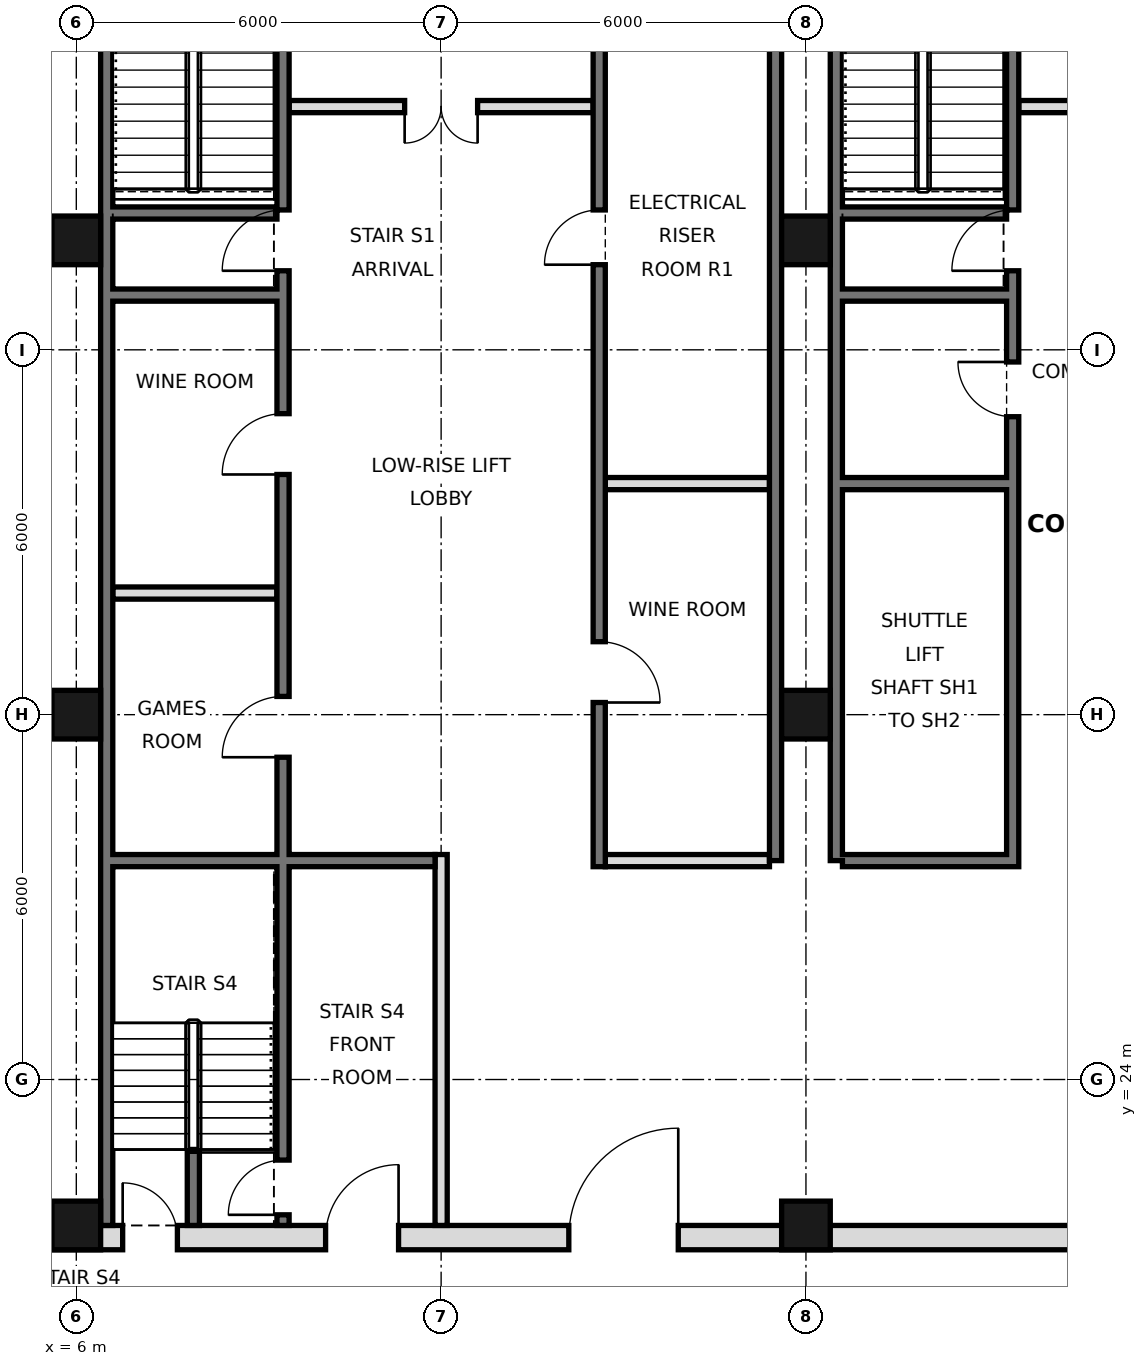
"""IFC4 building model, lengths in metres.
Left out: names, types, materials, properties, quantities, classifications, styles, units other than length and angle.
Written with IfcOpenShell. Run it as: python <this file> out.ifc"""

import sys

from ifc_helpers import new_model, si_unit, direction, frame, frame_2d, origin, origin_2d, place, context, subcontext, project, spatial, rectangle, hollow_rectangle, extrude, element, fill, save


model = new_model("IFC4")
c1 = context("Model", 3, precision=1e-05, world=origin(), true_north=direction((0.0, 1.0)))
c2 = subcontext(c1, "Body", "Model", "MODEL_VIEW")
j1 = project(units=[si_unit("LENGTHUNIT", "METRE"), si_unit("PLANEANGLEUNIT", "RADIAN")], contexts=[c1])
p1 = place(None, origin())
s1 = spatial("IfcSite", under=j1, at=p1, CompositionType="ELEMENT")
p2 = place(p1, origin())
s2 = spatial("IfcBuilding", under=s1, at=p2, CompositionType="ELEMENT")
p3 = place(p2, frame((0.0, 0.0, 186.0)))
s3 = spatial("IfcBuildingStorey", under=s2, at=p3, CompositionType="ELEMENT", Elevation=186.0)
for number, where, z_axis, x_axis in (
    (1, (6.0, 21.6, 0.0), (0.0, 0.0, 1.0), (1.0, 0.0, 0.0)),
    (2, (6.0, 30.0, 0.0), (0.0, 0.0, 1.0), (1.0, 0.0, 0.0)),
    (3, (6.0, 37.8, 0.0), (0.0, 0.0, 1.0), (1.0, 0.0, 0.0)),
    (4, (18.0, 21.6, 0.0), (0.0, 0.0, 1.0), (1.0, 0.0, 0.0)),
    (5, (18.0, 30.0, 0.0), (0.0, 0.0, 1.0), (1.0, 0.0, 0.0)),
    (6, (18.0, 37.8, 0.0), (0.0, 0.0, 1.0), (1.0, 0.0, 0.0)),
):
    element("IfcColumn", number, at=place(p3, frame(where, z_axis=z_axis, x_axis=x_axis)), inside=s3, PredefinedType="COLUMN", context=c2, shape_type="SweptSolid", body=[
        extrude(hollow_rectangle(XDim=0.8, YDim=0.8, WallThickness=0.045, at=origin_2d()), origin(), (0.0, 0.0, 1.0), 6.0),
    ])
p4 = place(p3, frame((6.5, 21.6, 0.0), z_axis=(0.0, 0.0, 1.0), x_axis=(0.0, 1.0, 0.0)))
e7 = element("IfcWall", 7, at=p4, inside=s3, PredefinedType="SOLIDWALL", context=c2, shape_type="SweptSolid", body=[
    extrude(rectangle(XDim=23.5, YDim=0.2, at=frame_2d((11.75, 0.0))), origin(), (0.0, 0.0, 1.0), 5.7),
])
for number, where, z_axis, x_axis in (
    (8, (17.5, 27.6, 0.0), (0.0, 0.0, 1.0), (0.0, 1.0, 0.0)),
    (9, (18.5, 27.6, 0.0), (0.0, 0.0, 1.0), (0.0, 1.0, 0.0)),
):
    element("IfcWall", number, at=place(p3, frame(where, z_axis=z_axis, x_axis=x_axis)), inside=s3, PredefinedType="SOLIDWALL", context=c2, shape_type="SweptSolid", body=[
        extrude(rectangle(XDim=17.5, YDim=0.2, at=frame_2d((8.75, 0.0))), origin(), (0.0, 0.0, 1.0), 5.7),
    ])
p5 = place(p3, frame((5.6, 21.4, 0.0), z_axis=(0.0, 0.0, 1.0), x_axis=(1.0, 0.0, 0.0)))
e10 = element("IfcWall", 10, at=p5, inside=s3, PredefinedType="SOLIDWALL", context=c2, shape_type="SweptSolid", body=[
    extrude(rectangle(XDim=36.8, YDim=0.4, at=frame_2d((18.4, 0.0))), origin(), (0.0, 0.0, 1.0), 5.7),
])
p6 = place(p5, frame((8.5, 0.0, 0.0)))
e11 = element("IfcOpeningElement", 11, at=p6, cuts=e10, PredefinedType="OPENING", context=c2, shape_type="SweptSolid", body=[
    extrude(rectangle(XDim=1.8, YDim=2.1, at=frame_2d((0.9, 1.05))), frame((0.0, 0.21, 0.0), z_axis=(0.0, -1.0, 0.0), x_axis=(1.0, 0.0, 0.0)), (0.0, 0.0, 1.0), 0.42),
])
p7 = place(p5, frame((17.5, 0.0, 0.0)))
e12 = element("IfcOpeningElement", 12, at=p7, cuts=e10, PredefinedType="OPENING", context=c2, shape_type="SweptSolid", body=[
    extrude(rectangle(XDim=1.8, YDim=2.1, at=frame_2d((0.9, 1.05))), frame((0.0, 0.21, 0.0), z_axis=(0.0, -1.0, 0.0), x_axis=(1.0, 0.0, 0.0)), (0.0, 0.0, 1.0), 0.42),
])
p8 = place(p5, frame((26.5, 0.0, 0.0)))
e13 = element("IfcOpeningElement", 13, at=p8, cuts=e10, PredefinedType="OPENING", context=c2, shape_type="SweptSolid", body=[
    extrude(rectangle(XDim=1.8, YDim=2.1, at=frame_2d((0.9, 1.05))), frame((0.0, 0.21, 0.0), z_axis=(0.0, -1.0, 0.0), x_axis=(1.0, 0.0, 0.0)), (0.0, 0.0, 1.0), 0.42),
])
p9 = place(p5, frame((4.5, 0.0, 0.0)))
e14 = element("IfcOpeningElement", 14, at=p9, cuts=e10, PredefinedType="OPENING", context=c2, shape_type="SweptSolid", body=[
    extrude(rectangle(XDim=1.2, YDim=2.1, at=frame_2d((0.6, 1.05))), frame((0.0, 0.21, 0.0), z_axis=(0.0, -1.0, 0.0), x_axis=(1.0, 0.0, 0.0)), (0.0, 0.0, 1.0), 0.42),
])
p10 = place(p5, frame((31.1, 0.0, 0.0)))
e15 = element("IfcOpeningElement", 15, at=p10, cuts=e10, PredefinedType="OPENING", context=c2, shape_type="SweptSolid", body=[
    extrude(rectangle(XDim=1.2, YDim=2.1, at=frame_2d((0.6, 1.05))), frame((0.0, 0.21, 0.0), z_axis=(0.0, -1.0, 0.0), x_axis=(1.0, 0.0, 0.0)), (0.0, 0.0, 1.0), 0.42),
])
p11 = place(p5, frame((1.163, 0.0, 0.0)))
e16 = element("IfcOpeningElement", 16, at=p11, cuts=e10, PredefinedType="OPENING", context=c2, shape_type="SweptSolid", body=[
    extrude(rectangle(XDim=0.9, YDim=2.1, at=frame_2d((0.45, 1.05))), frame((0.0, 0.21, 0.0), z_axis=(0.0, -1.0, 0.0), x_axis=(1.0, 0.0, 0.0)), (0.0, 0.0, 1.0), 0.42),
])
p12 = place(p5, frame((34.738, 0.0, 0.0)))
e17 = element("IfcOpeningElement", 17, at=p12, cuts=e10, PredefinedType="OPENING", context=c2, shape_type="SweptSolid", body=[
    extrude(rectangle(XDim=0.9, YDim=2.1, at=frame_2d((0.45, 1.05))), frame((0.0, 0.21, 0.0), z_axis=(0.0, -1.0, 0.0), x_axis=(1.0, 0.0, 0.0)), (0.0, 0.0, 1.0), 0.42),
])
p13 = place(p3, frame((12.0, 21.6, 0.0), z_axis=(0.0, 0.0, 1.0), x_axis=(0.0, 1.0, 0.0)))
e18 = element("IfcWall", 18, at=p13, inside=s3, PredefinedType="PARTITIONING", context=c2, shape_type="SweptSolid", body=[
    extrude(rectangle(XDim=6.1, YDim=0.2, at=frame_2d((3.05, 0.0))), origin(), (0.0, 0.0, 1.0), 5.7),
])
p14 = place(p3, frame((14.6, 27.5, 0.0), z_axis=(0.0, 0.0, 1.0), x_axis=(0.0, 1.0, 0.0)))
e19 = element("IfcWall", 19, at=p14, inside=s3, PredefinedType="SOLIDWALL", context=c2, shape_type="SweptSolid", body=[
    extrude(rectangle(XDim=17.5, YDim=0.2, at=frame_2d((8.75, 0.0))), origin(), (0.0, 0.0, 1.0), 5.7),
])
p15 = place(p14, frame((15.4, 0.0, 0.0)))
e20 = element("IfcOpeningElement", 20, at=p15, cuts=e19, PredefinedType="OPENING", context=c2, shape_type="SweptSolid", body=[
    extrude(rectangle(XDim=1.1, YDim=2.1, at=frame_2d((0.55, 1.05))), frame((0.0, 0.11, 0.0), z_axis=(0.0, -1.0, 0.0), x_axis=(1.0, 0.0, 0.0)), (0.0, 0.0, 1.0), 0.22),
])
p16 = place(p14, frame((2.7, 0.0, 0.0)))
e21 = element("IfcOpeningElement", 21, at=p16, cuts=e19, PredefinedType="OPENING", context=c2, shape_type="SweptSolid", body=[
    extrude(rectangle(XDim=1.0, YDim=2.1, at=frame_2d((0.5, 1.05))), frame((0.0, 0.11, 0.0), z_axis=(0.0, -1.0, 0.0), x_axis=(1.0, 0.0, 0.0)), (0.0, 0.0, 1.0), 0.22),
])
p17 = place(p14, frame((9.9, 0.0, 0.0)))
e22 = element("IfcOpeningElement", 22, at=p17, cuts=e19, PredefinedType="OPENING", context=c2, shape_type="SweptSolid", body=[
    extrude(rectangle(XDim=0.9, YDim=2.1, at=frame_2d((0.45, 1.05))), frame((0.0, 0.11, 0.0), z_axis=(0.0, -1.0, 0.0), x_axis=(1.0, 0.0, 0.0)), (0.0, 0.0, 1.0), 0.22),
])
p18 = place(p3, frame((21.4, 27.5, 0.0), z_axis=(0.0, 0.0, 1.0), x_axis=(0.0, 1.0, 0.0)))
e23 = element("IfcWall", 23, at=p18, inside=s3, PredefinedType="SOLIDWALL", context=c2, shape_type="SweptSolid", body=[
    extrude(rectangle(XDim=17.5, YDim=0.2, at=frame_2d((8.75, 0.0))), origin(), (0.0, 0.0, 1.0), 5.7),
])
p19 = place(p18, frame((9.8, 0.0, 0.0)))
e24 = element("IfcOpeningElement", 24, at=p19, cuts=e23, PredefinedType="OPENING", context=c2, shape_type="SweptSolid", body=[
    extrude(rectangle(XDim=1.0, YDim=2.1, at=frame_2d((0.5, 1.05))), frame((0.0, 0.11, 0.0), z_axis=(0.0, -1.0, 0.0), x_axis=(1.0, 0.0, 0.0)), (0.0, 0.0, 1.0), 0.22),
])
p20 = place(p18, frame((16.2, 0.0, 0.0)))
e25 = element("IfcOpeningElement", 25, at=p20, cuts=e23, PredefinedType="OPENING", context=c2, shape_type="SweptSolid", body=[
    extrude(rectangle(XDim=1.0, YDim=2.1, at=frame_2d((0.5, 1.05))), frame((0.0, 0.11, 0.0), z_axis=(0.0, -1.0, 0.0), x_axis=(1.0, 0.0, 0.0)), (0.0, 0.0, 1.0), 0.22),
])
p21 = place(p18, frame((7.4, 0.0, 0.0)))
e26 = element("IfcOpeningElement", 26, at=p21, cuts=e23, PredefinedType="OPENING", context=c2, shape_type="SweptSolid", body=[
    extrude(rectangle(XDim=0.9, YDim=2.1, at=frame_2d((0.45, 1.05))), frame((0.0, 0.11, 0.0), z_axis=(0.0, -1.0, 0.0), x_axis=(1.0, 0.0, 0.0)), (0.0, 0.0, 1.0), 0.22),
])
p22 = place(p3, frame((7.925, 21.6, 0.0), z_axis=(0.0, 0.0, 1.0), x_axis=(0.0, 1.0, 0.0)))
e27 = element("IfcWall", 27, at=p22, inside=s3, PredefinedType="SOLIDWALL", context=c2, shape_type="SweptSolid", body=[
    extrude(rectangle(XDim=1.25, YDim=0.2, at=frame_2d((0.625, 0.0))), origin(), (0.0, 0.0, 1.0), 5.7),
])
p23 = place(p3, frame((9.4, 21.6, 0.0), z_axis=(0.0, 0.0, 1.0), x_axis=(0.0, 1.0, 0.0)))
e28 = element("IfcWall", 28, at=p23, inside=s3, PredefinedType="SOLIDWALL", context=c2, shape_type="SweptSolid", body=[
    extrude(rectangle(XDim=23.4, YDim=0.2, at=frame_2d((11.7, 0.0))), origin(), (0.0, 0.0, 1.0), 5.7),
])
p24 = place(p23, frame((7.7, 0.0, 0.0)))
e29 = element("IfcOpeningElement", 29, at=p24, cuts=e28, PredefinedType="OPENING", context=c2, shape_type="SweptSolid", body=[
    extrude(rectangle(XDim=1.0, YDim=2.1, at=frame_2d((0.5, 1.05))), frame((0.0, 0.11, 0.0), z_axis=(0.0, -1.0, 0.0), x_axis=(1.0, 0.0, 0.0)), (0.0, 0.0, 1.0), 0.22),
])
p25 = place(p23, frame((12.35, 0.0, 0.0)))
e30 = element("IfcOpeningElement", 30, at=p25, cuts=e28, PredefinedType="OPENING", context=c2, shape_type="SweptSolid", body=[
    extrude(rectangle(XDim=1.0, YDim=2.1, at=frame_2d((0.5, 1.05))), frame((0.0, 0.11, 0.0), z_axis=(0.0, -1.0, 0.0), x_axis=(1.0, 0.0, 0.0)), (0.0, 0.0, 1.0), 0.22),
])
p26 = place(p23, frame((15.7, 0.0, 0.0)))
e31 = element("IfcOpeningElement", 31, at=p26, cuts=e28, PredefinedType="OPENING", context=c2, shape_type="SweptSolid", body=[
    extrude(rectangle(XDim=1.0, YDim=2.1, at=frame_2d((0.5, 1.05))), frame((0.0, 0.11, 0.0), z_axis=(0.0, -1.0, 0.0), x_axis=(1.0, 0.0, 0.0)), (0.0, 0.0, 1.0), 0.22),
])
p27 = place(p23, frame((22.1, 0.0, 0.0)))
e32 = element("IfcOpeningElement", 32, at=p27, cuts=e28, PredefinedType="OPENING", context=c2, shape_type="SweptSolid", body=[
    extrude(rectangle(XDim=1.0, YDim=2.1, at=frame_2d((0.5, 1.05))), frame((0.0, 0.11, 0.0), z_axis=(0.0, -1.0, 0.0), x_axis=(1.0, 0.0, 0.0)), (0.0, 0.0, 1.0), 0.22),
])
p28 = place(p23, frame((0.175, 0.0, 0.0)))
e33 = element("IfcOpeningElement", 33, at=p28, cuts=e28, PredefinedType="OPENING", context=c2, shape_type="SweptSolid", body=[
    extrude(rectangle(XDim=0.9, YDim=2.1, at=frame_2d((0.45, 1.05))), frame((0.0, 0.11, 0.0), z_axis=(0.0, -1.0, 0.0), x_axis=(1.0, 0.0, 0.0)), (0.0, 0.0, 1.0), 0.22),
])
p29 = place(p3, frame((14.7, 27.6, 0.0), z_axis=(0.0, 0.0, 1.0), x_axis=(1.0, 0.0, 0.0)))
e34 = element("IfcWall", 34, at=p29, inside=s3, PredefinedType="PARTITIONING", context=c2, shape_type="SweptSolid", body=[
    extrude(rectangle(XDim=2.7, YDim=0.2, at=frame_2d((1.35, 0.0))), origin(), (0.0, 0.0, 1.0), 5.7),
])
p30 = place(p3, frame((18.6, 27.6, 0.0), z_axis=(0.0, 0.0, 1.0), x_axis=(1.0, 0.0, 0.0)))
e35 = element("IfcWall", 35, at=p30, inside=s3, PredefinedType="SOLIDWALL", context=c2, shape_type="SweptSolid", body=[
    extrude(rectangle(XDim=2.7, YDim=0.2, at=frame_2d((1.35, 0.0))), origin(), (0.0, 0.0, 1.0), 5.7),
])
p31 = place(p3, frame((6.6, 27.6, 0.0), z_axis=(0.0, 0.0, 1.0), x_axis=(1.0, 0.0, 0.0)))
e36 = element("IfcWall", 36, at=p31, inside=s3, PredefinedType="SOLIDWALL", context=c2, shape_type="SweptSolid", body=[
    extrude(rectangle(XDim=5.3, YDim=0.2, at=frame_2d((2.65, 0.0))), origin(), (0.0, 0.0, 1.0), 5.7),
])
p32 = place(p3, frame((6.6, 32.0, 0.0), z_axis=(0.0, 0.0, 1.0), x_axis=(1.0, 0.0, 0.0)))
e37 = element("IfcWall", 37, at=p32, inside=s3, PredefinedType="PARTITIONING", context=c2, shape_type="SweptSolid", body=[
    extrude(rectangle(XDim=2.7, YDim=0.2, at=frame_2d((1.35, 0.0))), origin(), (0.0, 0.0, 1.0), 5.7),
])
for number, where, z_axis, x_axis in (
    (38, (14.7, 33.8, 0.0), (0.0, 0.0, 1.0), (1.0, 0.0, 0.0)),
    (39, (18.6, 33.8, 0.0), (0.0, 0.0, 1.0), (1.0, 0.0, 0.0)),
    (40, (18.6, 36.9, 0.0), (0.0, 0.0, 1.0), (1.0, 0.0, 0.0)),
    (41, (6.6, 36.9, 0.0), (0.0, 0.0, 1.0), (1.0, 0.0, 0.0)),
):
    element("IfcWall", number, at=place(p3, frame(where, z_axis=z_axis, x_axis=x_axis)), inside=s3, PredefinedType="SOLIDWALL", context=c2, shape_type="SweptSolid", body=[
        extrude(rectangle(XDim=2.7, YDim=0.2, at=frame_2d((1.35, 0.0))), origin(), (0.0, 0.0, 1.0), 5.7),
    ])
for number, where, z_axis, x_axis in (
    (42, (18.6, 38.25, 0.0), (0.0, 0.0, 1.0), (1.0, 0.0, 0.0)),
    (43, (6.6, 38.25, 0.0), (0.0, 0.0, 1.0), (1.0, 0.0, 0.0)),
):
    element("IfcWall", number, at=place(p3, frame(where, z_axis=z_axis, x_axis=x_axis)), inside=s3, PredefinedType="SOLIDWALL", context=c2, shape_type="SweptSolid", body=[
        extrude(rectangle(XDim=2.7, YDim=0.2, at=frame_2d((1.35, 0.0))), origin(), (0.0, 0.0, 1.0), 2.8),
    ])
p33 = place(p3, frame((21.5, 40.0, 0.0), z_axis=(0.0, 0.0, 1.0), x_axis=(1.0, 0.0, 0.0)))
e44 = element("IfcWall", 44, at=p33, inside=s3, PredefinedType="PARTITIONING", context=c2, shape_type="SweptSolid", body=[
    extrude(rectangle(XDim=7.9, YDim=0.2, at=frame_2d((3.95, 0.0))), origin(), (0.0, 0.0, 1.0), 5.7),
])
p34 = place(p33, frame((1.9, 0.0, 0.0)))
e45 = element("IfcOpeningElement", 45, at=p34, cuts=e44, PredefinedType="OPENING", context=c2, shape_type="SweptSolid", body=[
    extrude(rectangle(XDim=1.2, YDim=2.1, at=frame_2d((0.6, 1.05))), frame((0.0, 0.11, 0.0), z_axis=(0.0, -1.0, 0.0), x_axis=(1.0, 0.0, 0.0)), (0.0, 0.0, 1.0), 0.22),
])
p35 = place(p3, frame((9.5, 40.0, 0.0), z_axis=(0.0, 0.0, 1.0), x_axis=(1.0, 0.0, 0.0)))
e46 = element("IfcWall", 46, at=p35, inside=s3, PredefinedType="PARTITIONING", context=c2, shape_type="SweptSolid", body=[
    extrude(rectangle(XDim=5.0, YDim=0.2, at=frame_2d((2.5, 0.0))), origin(), (0.0, 0.0, 1.0), 5.7),
])
p36 = place(p35, frame((1.9, 0.0, 0.0)))
e47 = element("IfcOpeningElement", 47, at=p36, cuts=e46, PredefinedType="OPENING", context=c2, shape_type="SweptSolid", body=[
    extrude(rectangle(XDim=1.2, YDim=2.1, at=frame_2d((0.6, 1.05))), frame((0.0, 0.11, 0.0), z_axis=(0.0, -1.0, 0.0), x_axis=(1.0, 0.0, 0.0)), (0.0, 0.0, 1.0), 0.22),
])
p37 = place(p6, frame((1.8, 0.0, 0.0), z_axis=(0.0, 0.0, 1.0), x_axis=(-1.0, 0.0, 0.0)))
e48 = element("IfcDoor", 48, at=p37, inside=s3, OperationType="SINGLE_SWING_LEFT", PredefinedType="DOOR", context=c2, shape_type="SweptSolid", body=[
    extrude(rectangle(XDim=1.8, YDim=2.1, at=frame_2d((0.9, 1.05))), frame((0.0, 0.025, 0.0), z_axis=(0.0, -1.0, 0.0), x_axis=(1.0, 0.0, 0.0)), (0.0, 0.0, 1.0), 0.05),
])
fill(e11, e48)
p38 = place(p9, frame((1.2, 0.0, 0.0), z_axis=(0.0, 0.0, 1.0), x_axis=(-1.0, 0.0, 0.0)))
e49 = element("IfcDoor", 49, at=p38, inside=s3, OperationType="SINGLE_SWING_LEFT", PredefinedType="DOOR", context=c2, shape_type="SweptSolid", body=[
    extrude(rectangle(XDim=1.2, YDim=2.1, at=frame_2d((0.6, 1.05))), frame((0.0, 0.025, 0.0), z_axis=(0.0, -1.0, 0.0), x_axis=(1.0, 0.0, 0.0)), (0.0, 0.0, 1.0), 0.05),
])
fill(e14, e49)
p39 = place(p36, frame((1.2, 0.0, 0.0), z_axis=(0.0, 0.0, 1.0), x_axis=(-1.0, 0.0, 0.0)))
e50 = element("IfcDoor", 50, at=p39, inside=s3, OperationType="DOUBLE_DOOR_SINGLE_SWING", PredefinedType="DOOR", context=c2, shape_type="SweptSolid", body=[
    extrude(rectangle(XDim=1.2, YDim=2.1, at=frame_2d((0.6, 1.05))), frame((0.0, 0.025, 0.0), z_axis=(0.0, -1.0, 0.0), x_axis=(1.0, 0.0, 0.0)), (0.0, 0.0, 1.0), 0.05),
])
fill(e47, e50)
p40 = place(p16, frame((1.0, 0.0, 0.0), z_axis=(0.0, 0.0, 1.0), x_axis=(-1.0, 0.0, 0.0)))
e51 = element("IfcDoor", 51, at=p40, inside=s3, OperationType="SINGLE_SWING_RIGHT", PredefinedType="DOOR", context=c2, shape_type="SweptSolid", body=[
    extrude(rectangle(XDim=1.0, YDim=2.1, at=frame_2d((0.5, 1.05))), frame((0.0, 0.025, 0.0), z_axis=(0.0, -1.0, 0.0), x_axis=(1.0, 0.0, 0.0)), (0.0, 0.0, 1.0), 0.05),
])
fill(e21, e51)
p41 = place(p24, origin())
e52 = element("IfcDoor", 52, at=p41, inside=s3, OperationType="SINGLE_SWING_LEFT", PredefinedType="DOOR", context=c2, shape_type="SweptSolid", body=[
    extrude(rectangle(XDim=1.0, YDim=2.1, at=frame_2d((0.5, 1.05))), frame((0.0, 0.025, 0.0), z_axis=(0.0, -1.0, 0.0), x_axis=(1.0, 0.0, 0.0)), (0.0, 0.0, 1.0), 0.05),
])
fill(e29, e52)
p42 = place(p25, origin())
e53 = element("IfcDoor", 53, at=p42, inside=s3, OperationType="SINGLE_SWING_LEFT", PredefinedType="DOOR", context=c2, shape_type="SweptSolid", body=[
    extrude(rectangle(XDim=1.0, YDim=2.1, at=frame_2d((0.5, 1.05))), frame((0.0, 0.025, 0.0), z_axis=(0.0, -1.0, 0.0), x_axis=(1.0, 0.0, 0.0)), (0.0, 0.0, 1.0), 0.05),
])
fill(e30, e53)
p43 = place(p26, origin())
e54 = element("IfcDoor", 54, at=p43, inside=s3, OperationType="SINGLE_SWING_LEFT", PredefinedType="DOOR", context=c2, shape_type="SweptSolid", body=[
    extrude(rectangle(XDim=1.0, YDim=2.1, at=frame_2d((0.5, 1.05))), frame((0.0, 0.025, 0.0), z_axis=(0.0, -1.0, 0.0), x_axis=(1.0, 0.0, 0.0)), (0.0, 0.0, 1.0), 0.05),
])
fill(e31, e54)
p44 = place(p19, origin())
e55 = element("IfcDoor", 55, at=p44, inside=s3, OperationType="SINGLE_SWING_LEFT", PredefinedType="DOOR", context=c2, shape_type="SweptSolid", body=[
    extrude(rectangle(XDim=1.0, YDim=2.1, at=frame_2d((0.5, 1.05))), frame((0.0, 0.025, 0.0), z_axis=(0.0, -1.0, 0.0), x_axis=(1.0, 0.0, 0.0)), (0.0, 0.0, 1.0), 0.05),
])
fill(e24, e55)
p45 = place(p11, origin())
e56 = element("IfcDoor", 56, at=p45, inside=s3, OperationType="SINGLE_SWING_LEFT", PredefinedType="DOOR", context=c2, shape_type="SweptSolid", body=[
    extrude(rectangle(XDim=0.9, YDim=2.1, at=frame_2d((0.45, 1.05))), frame((0.0, 0.025, 0.0), z_axis=(0.0, -1.0, 0.0), x_axis=(1.0, 0.0, 0.0)), (0.0, 0.0, 1.0), 0.05),
])
fill(e16, e56)
p46 = place(p28, origin())
e57 = element("IfcDoor", 57, at=p46, inside=s3, OperationType="SINGLE_SWING_LEFT", PredefinedType="DOOR", context=c2, shape_type="SweptSolid", body=[
    extrude(rectangle(XDim=0.9, YDim=2.1, at=frame_2d((0.45, 1.05))), frame((0.0, 0.025, 0.0), z_axis=(0.0, -1.0, 0.0), x_axis=(1.0, 0.0, 0.0)), (0.0, 0.0, 1.0), 0.05),
])
fill(e33, e57)
p47 = place(p17, origin())
e58 = element("IfcDoor", 58, at=p47, inside=s3, OperationType="SINGLE_SWING_LEFT", PredefinedType="DOOR", context=c2, shape_type="SweptSolid", body=[
    extrude(rectangle(XDim=0.9, YDim=2.1, at=frame_2d((0.45, 1.05))), frame((0.0, 0.025, 0.0), z_axis=(0.0, -1.0, 0.0), x_axis=(1.0, 0.0, 0.0)), (0.0, 0.0, 1.0), 0.05),
])
fill(e22, e58)
p48 = place(p21, frame((0.9, 0.0, 0.0), z_axis=(0.0, 0.0, 1.0), x_axis=(-1.0, 0.0, 0.0)))
e59 = element("IfcDoor", 59, at=p48, inside=s3, OperationType="SINGLE_SWING_LEFT", PredefinedType="DOOR", context=c2, shape_type="SweptSolid", body=[
    extrude(rectangle(XDim=0.9, YDim=2.1, at=frame_2d((0.45, 1.05))), frame((0.0, 0.025, 0.0), z_axis=(0.0, -1.0, 0.0), x_axis=(1.0, 0.0, 0.0)), (0.0, 0.0, 1.0), 0.05),
])
fill(e26, e59)
save(model, sys.argv[1])
